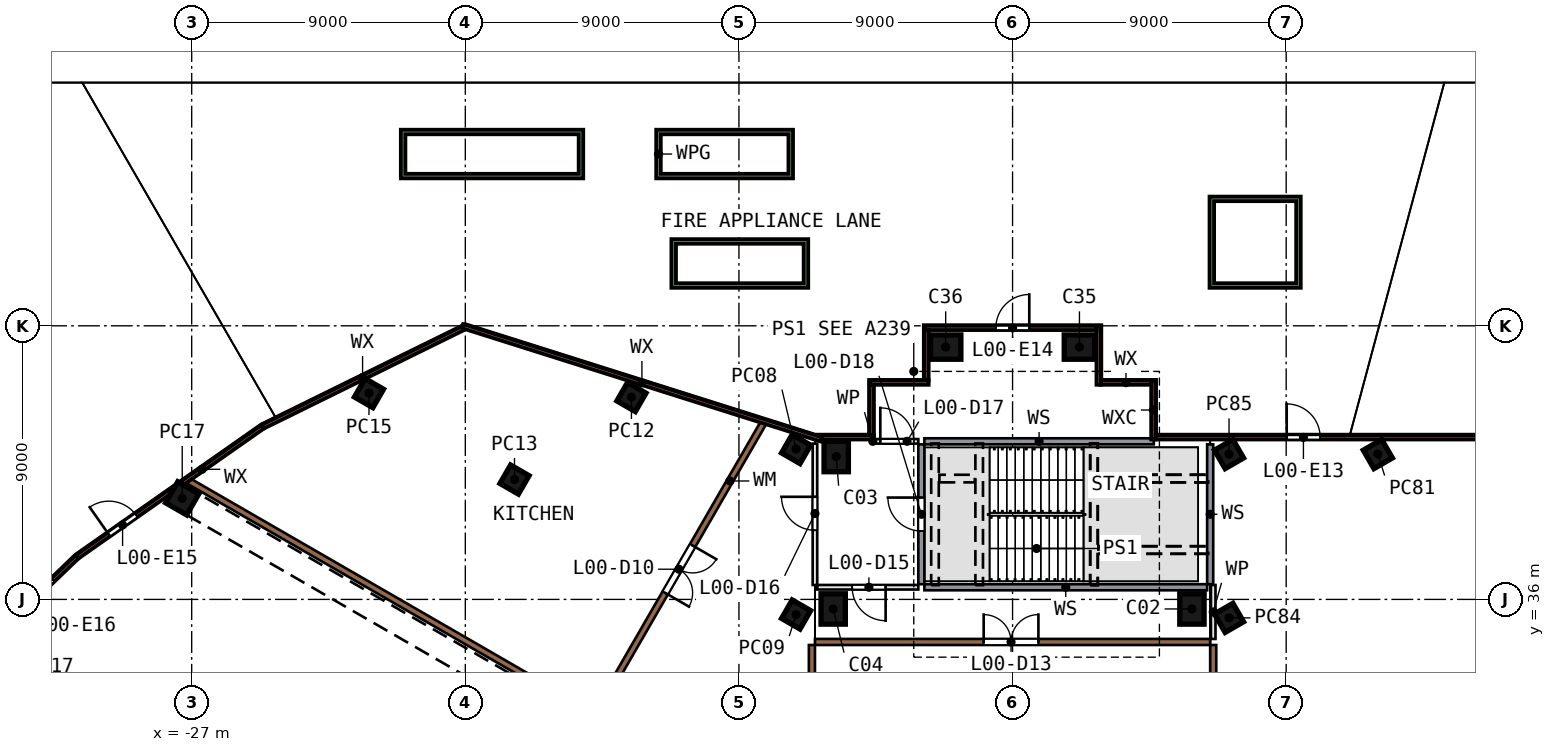
"""IFC4 building model, lengths in metres.
Left out: names, types, materials, properties, quantities, classifications, styles, units other than length and angle.
Written with IfcOpenShell. Run it as: python <this file> out.ifc"""

import sys

from ifc_helpers import new_model, si_unit, direction, frame, frame_2d, origin, origin_2d, place, context, subcontext, project, spatial, polyline, rectangle, outline, extrude, element, fill, save


model = new_model("IFC4")
c1 = context("Model", 3, precision=1e-05, world=origin(), true_north=direction((0.0, 1.0)))
c2 = subcontext(c1, "Body", "Model", "MODEL_VIEW")
j1 = project(units=[si_unit("LENGTHUNIT", "METRE"), si_unit("PLANEANGLEUNIT", "RADIAN")], contexts=[c1])
p1 = place(None, origin())
s1 = spatial("IfcSite", under=j1, at=p1, CompositionType="ELEMENT")
p2 = place(p1, origin())
s2 = spatial("IfcBuilding", under=s1, at=p2, CompositionType="ELEMENT")
p3 = place(p2, origin())
s3 = spatial("IfcBuildingStorey", under=s2, at=p3, CompositionType="ELEMENT", Elevation=0.0)
for number, where, z_axis, x_axis in (
    (1, (5.9, 35.686, 0.0), (0.0, 0.0, 1.0), (0.0, 1.0, 0.0)),
    (2, (-5.8, 40.7, 0.0), (0.0, 0.0, 1.0), (0.0, -1.0, 0.0)),
    (3, (-5.9, 35.686, 0.0), (0.0, 0.0, 1.0), (0.0, -1.0, 0.0)),
    (4, (2.2, 44.3, 0.0), (0.0, 0.0, 1.0), (-1.0, 0.0, 0.0)),
    (5, (-2.2, 44.3, 0.0), (0.0, 0.0, 1.0), (-1.0, 0.0, 0.0)),
):
    element("IfcColumn", number, at=place(p3, frame(where, z_axis=z_axis, x_axis=x_axis)), inside=s3, PredefinedType="COLUMN", context=c2, shape_type="SweptSolid", body=[
        extrude(rectangle(XDim=1.0, YDim=0.8, at=origin_2d()), origin(), (0.0, 0.0, 1.0), 7.55),
    ])
for number, where, z_axis, x_axis in (
    (6, (-7.12, 40.946, 0.0), (0.0, 0.0, 1.0), (-0.866, 0.5, 0.0)),
    (7, (-7.12, 35.503, 0.0), (0.0, 0.0, 1.0), (-0.866, 0.5, 0.0)),
    (8, (-12.536, 42.657, 0.0), (0.0, 0.0, 1.0), (-0.866, 0.5, 0.0)),
    (9, (-16.382, 39.942, 0.0), (0.0, 0.0, 1.0), (-0.866, 0.5, 0.0)),
    (10, (-21.168, 42.786, 0.0), (0.0, 0.0, 1.0), (-0.866, 0.5, 0.0)),
):
    element("IfcColumn", number, at=place(p3, frame(where, z_axis=z_axis, x_axis=x_axis)), inside=s3, PredefinedType="COLUMN", context=c2, shape_type="SweptSolid", body=[
        extrude(rectangle(XDim=0.7, YDim=0.7, at=origin_2d()), origin(), (0.0, 0.0, 1.0), 8.0),
    ])
p4 = place(p3, frame((-27.312, 39.324, 0.0), z_axis=(0.0, 0.0, 1.0), x_axis=(-0.866025404, 0.5, 0.0)))
e11 = element("IfcColumn", 11, at=p4, inside=s3, PredefinedType="COLUMN", context=c2, shape_type="SweptSolid", body=[
    extrude(rectangle(XDim=0.8, YDim=0.8, at=origin_2d()), origin(), (0.0, 0.0, 1.0), 8.0),
])
for number, where, z_axis, x_axis in (
    (12, (12.014, 40.78, 0.0), (0.0, 0.0, 1.0), (0.866, 0.5, 0.0)),
    (13, (7.12, 35.392, 0.0), (0.0, 0.0, 1.0), (0.866, 0.5, 0.0)),
    (14, (7.12, 40.78, 0.0), (0.0, 0.0, 1.0), (0.866, 0.5, 0.0)),
):
    element("IfcColumn", number, at=place(p3, frame(where, z_axis=z_axis, x_axis=x_axis)), inside=s3, PredefinedType="COLUMN", context=c2, shape_type="SweptSolid", body=[
        extrude(rectangle(XDim=0.7, YDim=0.7, at=origin_2d()), origin(), (0.0, 0.0, 1.0), 8.0),
    ])
p5 = place(p3, frame((4.7, 41.33, 0.0), z_axis=(0.0, 0.0, 1.0), x_axis=(1.0, 0.0, 0.0)))
e15 = element("IfcWall", 15, at=p5, inside=s3, PredefinedType="SOLIDWALL", context=c2, shape_type="SweptSolid", body=[
    extrude(rectangle(XDim=17.156, YDim=0.14, at=frame_2d((8.578, 0.0))), origin(), (0.0, 0.0, 1.0), 7.55),
])
p6 = place(p5, frame((4.317, 0.0, 0.0)))
e16 = element("IfcOpeningElement", 16, at=p6, cuts=e15, PredefinedType="OPENING", context=c2, shape_type="SweptSolid", body=[
    extrude(rectangle(XDim=1.1, YDim=2.4, at=frame_2d((0.55, 1.2))), frame((0.0, 0.08, 0.0), z_axis=(0.0, -1.0, 0.0), x_axis=(1.0, 0.0, 0.0)), (0.0, 0.0, 1.0), 0.16),
])
p7 = place(p3, frame((4.63, 41.26, 0.0), z_axis=(0.0, 0.0, 1.0), x_axis=(0.0, 1.0, 0.0)))
e17 = element("IfcWall", 17, at=p7, inside=s3, PredefinedType="SOLIDWALL", context=c2, shape_type="SweptSolid", body=[
    extrude(rectangle(XDim=1.94, YDim=0.14, at=frame_2d((0.97, 0.0))), origin(), (0.0, 0.0, 1.0), 7.55),
])
p8 = place(p3, frame((4.56, 43.13, 0.0), z_axis=(0.0, 0.0, 1.0), x_axis=(-1.0, 0.0, 0.0)))
e18 = element("IfcWall", 18, at=p8, inside=s3, PredefinedType="SOLIDWALL", context=c2, shape_type="SweptSolid", body=[
    extrude(rectangle(XDim=1.66, YDim=0.14, at=frame_2d((0.83, 0.0))), origin(), (0.0, 0.0, 1.0), 7.55),
])
p9 = place(p3, frame((2.83, 43.06, 0.0), z_axis=(0.0, 0.0, 1.0), x_axis=(0.0, 1.0, 0.0)))
e19 = element("IfcWall", 19, at=p9, inside=s3, PredefinedType="SOLIDWALL", context=c2, shape_type="SweptSolid", body=[
    extrude(rectangle(XDim=1.94, YDim=0.14, at=frame_2d((0.97, 0.0))), origin(), (0.0, 0.0, 1.0), 7.55),
])
p10 = place(p3, frame((-2.9, 44.93, 0.0), z_axis=(0.0, 0.0, 1.0), x_axis=(1.0, 0.0, 0.0)))
e20 = element("IfcWall", 20, at=p10, inside=s3, PredefinedType="SOLIDWALL", context=c2, shape_type="SweptSolid", body=[
    extrude(rectangle(XDim=5.66, YDim=0.14, at=frame_2d((2.83, 0.0))), origin(), (0.0, 0.0, 1.0), 7.55),
])
p11 = place(p10, frame((2.35, 0.0, 0.0)))
e21 = element("IfcOpeningElement", 21, at=p11, cuts=e20, PredefinedType="OPENING", context=c2, shape_type="SweptSolid", body=[
    extrude(rectangle(XDim=1.1, YDim=2.4, at=frame_2d((0.55, 1.2))), frame((0.0, 0.08, 0.0), z_axis=(0.0, -1.0, 0.0), x_axis=(1.0, 0.0, 0.0)), (0.0, 0.0, 1.0), 0.16),
])
p12 = place(p3, frame((-2.83, 44.86, 0.0), z_axis=(0.0, 0.0, 1.0), x_axis=(0.0, -1.0, 0.0)))
e22 = element("IfcWall", 22, at=p12, inside=s3, PredefinedType="SOLIDWALL", context=c2, shape_type="SweptSolid", body=[
    extrude(rectangle(XDim=1.66, YDim=0.14, at=frame_2d((0.83, 0.0))), origin(), (0.0, 0.0, 1.0), 7.55),
])
p13 = place(p3, frame((-2.76, 43.13, 0.0), z_axis=(0.0, 0.0, 1.0), x_axis=(-1.0, 0.0, 0.0)))
e23 = element("IfcWall", 23, at=p13, inside=s3, PredefinedType="SOLIDWALL", context=c2, shape_type="SweptSolid", body=[
    extrude(rectangle(XDim=1.94, YDim=0.14, at=frame_2d((0.97, 0.0))), origin(), (0.0, 0.0, 1.0), 7.55),
])
p14 = place(p3, frame((-4.63, 43.06, 0.0), z_axis=(0.0, 0.0, 1.0), x_axis=(0.0, -1.0, 0.0)))
e24 = element("IfcWall", 24, at=p14, inside=s3, PredefinedType="SOLIDWALL", context=c2, shape_type="SweptSolid", body=[
    extrude(rectangle(XDim=1.66, YDim=0.14, at=frame_2d((0.83, 0.0))), origin(), (0.0, 0.0, 1.0), 7.55),
])
p15 = place(p3, frame((-4.56, 41.33, 0.0), z_axis=(0.0, 0.0, 1.0), x_axis=(-1.0, 0.0, 0.0)))
e25 = element("IfcWall", 25, at=p15, inside=s3, PredefinedType="SOLIDWALL", context=c2, shape_type="SweptSolid", body=[
    extrude(rectangle(XDim=1.719, YDim=0.14, at=frame_2d((0.859, 0.0))), origin(), (0.0, 0.0, 1.0), 7.55),
])
p16 = place(p3, frame((-6.289, 41.26, 0.0), z_axis=(0.0, 0.0, 1.0), x_axis=(-0.953524528, 0.301315407, 0.0)))
e26 = element("IfcWall", 26, at=p16, inside=s3, PredefinedType="SOLIDWALL", context=c2, shape_type="SweptSolid", body=[
    extrude(rectangle(XDim=12.38, YDim=0.14, at=frame_2d((6.19, 0.0))), origin(), (0.0, 0.0, 1.0), 7.55),
])
p17 = place(p3, frame((-18.088, 44.915, 0.0), z_axis=(0.0, 0.0, 1.0), x_axis=(-0.897231327, -0.441560807, 0.0)))
e27 = element("IfcWall", 27, at=p17, inside=s3, PredefinedType="SOLIDWALL", context=c2, shape_type="SweptSolid", body=[
    extrude(rectangle(XDim=7.336, YDim=0.14, at=frame_2d((3.668, 0.0))), origin(), (0.0, 0.0, 1.0), 7.55),
])
p18 = place(p3, frame((-30.774, 37.396, 0.0), z_axis=(0.0, 0.0, 1.0), x_axis=(0.818847658, 0.5740109, 0.0)))
e28 = element("IfcWall", 28, at=p18, inside=s3, PredefinedType="SOLIDWALL", context=c2, shape_type="SweptSolid", body=[
    extrude(rectangle(XDim=7.466, YDim=0.14, at=frame_2d((3.733, 0.0))), origin(), (0.0, 0.0, 1.0), 7.55),
])
p19 = place(p18, frame((1.283, 0.0, 0.0)))
e29 = element("IfcOpeningElement", 29, at=p19, cuts=e28, PredefinedType="OPENING", context=c2, shape_type="SweptSolid", body=[
    extrude(rectangle(XDim=1.1, YDim=2.4, at=frame_2d((0.55, 1.2))), frame((0.0, 0.08, 0.0), z_axis=(0.0, -1.0, 0.0), x_axis=(1.0, 0.0, 0.0)), (0.0, 0.0, 1.0), 0.16),
])
p20 = place(p3, frame((-36.149, 32.229, 0.0), z_axis=(0.0, 0.0, 1.0), x_axis=(0.721028464, 0.692905444, 0.0)))
e30 = element("IfcWall", 30, at=p20, inside=s3, PredefinedType="SOLIDWALL", context=c2, shape_type="SweptSolid", body=[
    extrude(rectangle(XDim=7.466, YDim=0.14, at=frame_2d((3.733, 0.0))), origin(), (0.0, 0.0, 1.0), 7.55),
])
p21 = place(p20, frame((5.269, 0.0, 0.0)))
e31 = element("IfcOpeningElement", 31, at=p21, cuts=e30, PredefinedType="OPENING", context=c2, shape_type="SweptSolid", body=[
    extrude(rectangle(XDim=1.1, YDim=2.4, at=frame_2d((0.55, 1.2))), frame((0.0, 0.08, 0.0), z_axis=(0.0, -1.0, 0.0), x_axis=(1.0, 0.0, 0.0)), (0.0, 0.0, 1.0), 0.16),
])
p22 = place(p20, frame((3.327, 0.0, 0.0)))
e32 = element("IfcOpeningElement", 32, at=p22, cuts=e30, PredefinedType="OPENING", context=c2, shape_type="SweptSolid", body=[
    extrude(rectangle(XDim=1.1, YDim=2.4, at=frame_2d((0.55, 1.2))), frame((0.0, 0.08, 0.0), z_axis=(0.0, -1.0, 0.0), x_axis=(1.0, 0.0, 0.0)), (0.0, 0.0, 1.0), 0.16),
])
p23 = place(p20, frame((1.385, 0.0, 0.0)))
e33 = element("IfcOpeningElement", 33, at=p23, cuts=e30, PredefinedType="OPENING", context=c2, shape_type="SweptSolid", body=[
    extrude(rectangle(XDim=1.1, YDim=2.4, at=frame_2d((0.55, 1.2))), frame((0.0, 0.08, 0.0), z_axis=(0.0, -1.0, 0.0), x_axis=(1.0, 0.0, 0.0)), (0.0, 0.0, 1.0), 0.16),
])
p24 = place(p3, origin())
e34 = element("IfcWall", 34, at=p24, inside=s3, PredefinedType="SOLIDWALL", context=c2, shape_type="SweptSolid", body=[
    extrude(outline(polyline([(-11.221, 46.25), (-6.721, 46.25), (-6.721, 47.85), (-11.221, 47.85), (-11.221, 46.25)]), holes=[polyline([(-11.071, 46.4), (-11.071, 47.7), (-6.871, 47.7), (-6.871, 46.4), (-11.071, 46.4)])]), origin(), (0.0, 0.0, 1.0), 0.6),
])
p25 = place(p3, origin())
e35 = element("IfcWall", 35, at=p25, inside=s3, PredefinedType="SOLIDWALL", context=c2, shape_type="SweptSolid", body=[
    extrude(outline(polyline([(6.479, 46.25), (9.479, 46.25), (9.479, 49.25), (6.479, 49.25), (6.479, 46.25)]), holes=[polyline([(6.629, 46.4), (6.629, 49.1), (9.329, 49.1), (9.329, 46.4), (6.629, 46.4)])]), origin(), (0.0, 0.0, 1.0), 0.6),
])
p26 = place(p3, origin())
e36 = element("IfcWall", 36, at=p26, inside=s3, PredefinedType="SOLIDWALL", context=c2, shape_type="SweptSolid", body=[
    extrude(outline(polyline([(-20.121, 49.85), (-14.121, 49.85), (-14.121, 51.45), (-20.121, 51.45), (-20.121, 49.85)]), holes=[polyline([(-19.971, 50.0), (-19.971, 51.3), (-14.271, 51.3), (-14.271, 50.0), (-19.971, 50.0)])]), origin(), (0.0, 0.0, 1.0), 0.6),
])
p27 = place(p3, origin())
e37 = element("IfcWall", 37, at=p27, inside=s3, PredefinedType="SOLIDWALL", context=c2, shape_type="SweptSolid", body=[
    extrude(outline(polyline([(-11.721, 49.85), (-7.221, 49.85), (-7.221, 51.45), (-11.721, 51.45), (-11.721, 49.85)]), holes=[polyline([(-11.571, 50.0), (-11.571, 51.3), (-7.371, 51.3), (-7.371, 50.0), (-11.571, 50.0)])]), origin(), (0.0, 0.0, 1.0), 0.6),
])
p28 = place(p3, frame((-8.172, 41.846, 0.0), z_axis=(0.0, 0.0, 1.0), x_axis=(-0.499985024, -0.86603405, 0.0)))
e38 = element("IfcWall", 38, at=p28, inside=s3, PredefinedType="SOLIDWALL", context=c2, shape_type="SweptSolid", body=[
    extrude(rectangle(XDim=11.053, YDim=0.2, at=frame_2d((5.527, 0.0))), origin(), (0.0, 0.0, 1.0), 7.55),
])
p29 = place(p28, frame((4.704, 0.0, 0.0)))
e39 = element("IfcOpeningElement", 39, at=p29, cuts=e38, PredefinedType="OPENING", context=c2, shape_type="SweptSolid", body=[
    extrude(rectangle(XDim=1.8, YDim=2.1, at=frame_2d((0.9, 1.05))), frame((0.0, 0.11, 0.0), z_axis=(0.0, -1.0, 0.0), x_axis=(1.0, 0.0, 0.0)), (0.0, 0.0, 1.0), 0.22),
])
p30 = place(p3, frame((-13.835, 32.237, 0.0), z_axis=(0.0, 0.0, 1.0), x_axis=(-0.866027181, 0.499996921, 0.0)))
e40 = element("IfcWall", 40, at=p30, inside=s3, PredefinedType="SOLIDWALL", context=c2, shape_type="SweptSolid", body=[
    extrude(rectangle(XDim=15.348, YDim=0.2, at=frame_2d((7.674, 0.0))), origin(), (0.0, 0.0, 1.0), 7.55),
])
p31 = place(p3, frame((-6.6, 34.5, 0.0), z_axis=(0.0, 0.0, 1.0), x_axis=(0.0, -1.0, 0.0)))
e41 = element("IfcWall", 41, at=p31, inside=s3, PredefinedType="SOLIDWALL", context=c2, shape_type="SweptSolid", body=[
    extrude(rectangle(XDim=10.841, YDim=0.2, at=frame_2d((5.42, 0.0))), origin(), (0.0, 0.0, 1.0), 7.55),
])
p32 = place(p3, frame((-6.5, 34.6, 0.0), z_axis=(0.0, 0.0, 1.0), x_axis=(1.0, 0.0, 0.0)))
e42 = element("IfcWall", 42, at=p32, inside=s3, PredefinedType="SOLIDWALL", context=c2, shape_type="SweptSolid", body=[
    extrude(rectangle(XDim=13.0, YDim=0.2, at=frame_2d((6.5, 0.0))), origin(), (0.0, 0.0, 1.0), 7.55),
])
p33 = place(p32, frame((5.55, 0.0, 0.0)))
e43 = element("IfcOpeningElement", 43, at=p33, cuts=e42, PredefinedType="OPENING", context=c2, shape_type="SweptSolid", body=[
    extrude(rectangle(XDim=1.8, YDim=2.1, at=frame_2d((0.9, 1.05))), frame((0.0, 0.11, 0.0), z_axis=(0.0, -1.0, 0.0), x_axis=(1.0, 0.0, 0.0)), (0.0, 0.0, 1.0), 0.22),
])
p34 = place(p3, frame((-3.1, 36.4, 0.0), z_axis=(0.0, 0.0, 1.0), x_axis=(-1.0, 0.0, 0.0)))
e44 = element("IfcWall", 44, at=p34, inside=s3, PredefinedType="PARTITIONING", context=c2, shape_type="SweptSolid", body=[
    extrude(rectangle(XDim=3.325, YDim=0.15, at=frame_2d((1.663, 0.0))), origin(), (0.0, 0.0, 1.0), 7.55),
])
p35 = place(p34, frame((1.075, 0.0, 0.0)))
e45 = element("IfcOpeningElement", 45, at=p35, cuts=e44, PredefinedType="OPENING", context=c2, shape_type="SweptSolid", body=[
    extrude(rectangle(XDim=1.1, YDim=2.1, at=frame_2d((0.55, 1.05))), frame((0.0, 0.085, 0.0), z_axis=(0.0, -1.0, 0.0), x_axis=(1.0, 0.0, 0.0)), (0.0, 0.0, 1.0), 0.17),
])
p36 = place(p3, frame((-6.5, 36.475, 0.0), z_axis=(0.0, 0.0, 1.0), x_axis=(0.0, 1.0, 0.0)))
e46 = element("IfcWall", 46, at=p36, inside=s3, PredefinedType="PARTITIONING", context=c2, shape_type="SweptSolid", body=[
    extrude(rectangle(XDim=4.65, YDim=0.15, at=frame_2d((2.325, 0.0))), origin(), (0.0, 0.0, 1.0), 7.55),
])
p37 = place(p36, frame((1.8, 0.0, 0.0)))
e47 = element("IfcOpeningElement", 47, at=p37, cuts=e46, PredefinedType="OPENING", context=c2, shape_type="SweptSolid", body=[
    extrude(rectangle(XDim=1.1, YDim=2.1, at=frame_2d((0.55, 1.05))), frame((0.0, 0.085, 0.0), z_axis=(0.0, -1.0, 0.0), x_axis=(1.0, 0.0, 0.0)), (0.0, 0.0, 1.0), 0.17),
])
p38 = place(p3, frame((-2.9, 36.4, 0.0), z_axis=(0.0, 0.0, 1.0), x_axis=(1.0, 0.0, 0.0)))
e48 = element("IfcWall", 48, at=p38, inside=s3, PredefinedType="SOLIDWALL", context=c2, shape_type="SweptSolid", body=[
    extrude(rectangle(XDim=9.3, YDim=0.2, at=frame_2d((4.65, 0.0))), origin(), (0.0, 0.0, 1.0), 7.55),
])
p39 = place(p3, frame((-4.645, 41.2, 0.0), z_axis=(0.0, 0.0, 1.0), x_axis=(1.0, 0.0, 0.0)))
e49 = element("IfcWall", 49, at=p39, inside=s3, PredefinedType="PARTITIONING", context=c2, shape_type="SweptSolid", body=[
    extrude(rectangle(XDim=1.545, YDim=0.15, at=frame_2d((0.772, 0.0))), origin(), (0.0, 0.0, 1.0), 7.55),
])
p40 = place(p39, frame((0.295, 0.0, 0.0)))
e50 = element("IfcOpeningElement", 50, at=p40, cuts=e49, PredefinedType="OPENING", context=c2, shape_type="SweptSolid", body=[
    extrude(rectangle(XDim=1.1, YDim=2.1, at=frame_2d((0.55, 1.05))), frame((0.0, 0.085, 0.0), z_axis=(0.0, -1.0, 0.0), x_axis=(1.0, 0.0, 0.0)), (0.0, 0.0, 1.0), 0.17),
])
p41 = place(p3, frame((-3.0, 36.5, 0.0), z_axis=(0.0, 0.0, 1.0), x_axis=(0.0, 1.0, 0.0)))
e51 = element("IfcWall", 51, at=p41, inside=s3, PredefinedType="SOLIDWALL", context=c2, shape_type="SweptSolid", body=[
    extrude(rectangle(XDim=4.6, YDim=0.2, at=frame_2d((2.3, 0.0))), origin(), (0.0, 0.0, 1.0), 7.55),
])
p42 = place(p41, frame((1.75, 0.0, 0.0)))
e52 = element("IfcOpeningElement", 52, at=p42, cuts=e51, PredefinedType="OPENING", context=c2, shape_type="SweptSolid", body=[
    extrude(rectangle(XDim=1.1, YDim=2.1, at=frame_2d((0.55, 1.05))), frame((0.0, 0.11, 0.0), z_axis=(0.0, -1.0, 0.0), x_axis=(1.0, 0.0, 0.0)), (0.0, 0.0, 1.0), 0.22),
])
p43 = place(p3, frame((6.5, 36.5, 0.0), z_axis=(0.0, 0.0, 1.0), x_axis=(0.0, 1.0, 0.0)))
e53 = element("IfcWall", 53, at=p43, inside=s3, PredefinedType="SOLIDWALL", context=c2, shape_type="SweptSolid", body=[
    extrude(rectangle(XDim=4.6, YDim=0.2, at=frame_2d((2.3, 0.0))), origin(), (0.0, 0.0, 1.0), 7.55),
])
p44 = place(p3, frame((4.645, 41.2, 0.0), z_axis=(0.0, 0.0, 1.0), x_axis=(-1.0, 0.0, 0.0)))
e54 = element("IfcWall", 54, at=p44, inside=s3, PredefinedType="SOLIDWALL", context=c2, shape_type="SweptSolid", body=[
    extrude(rectangle(XDim=7.545, YDim=0.2, at=frame_2d((3.772, 0.0))), origin(), (0.0, 0.0, 1.0), 7.55),
])
p45 = place(p3, frame((6.6, 23.659, 0.0), z_axis=(0.0, 0.0, 1.0), x_axis=(0.0, 1.0, 0.0)))
e55 = element("IfcWall", 55, at=p45, inside=s3, PredefinedType="SOLIDWALL", context=c2, shape_type="SweptSolid", body=[
    extrude(rectangle(XDim=10.841, YDim=0.2, at=frame_2d((5.42, 0.0))), origin(), (0.0, 0.0, 1.0), 7.55),
])
p46 = place(p3, frame((6.6, 34.7, 0.0), z_axis=(0.0, 0.0, 1.0), x_axis=(0.0, 1.0, 0.0)))
e56 = element("IfcWall", 56, at=p46, inside=s3, PredefinedType="PARTITIONING", context=c2, shape_type="SweptSolid", body=[
    extrude(rectangle(XDim=1.775, YDim=0.15, at=frame_2d((0.888, 0.0))), origin(), (0.0, 0.0, 1.0), 7.55),
])
p47 = place(p6, origin())
e57 = element("IfcDoor", 57, at=p47, inside=s3, OperationType="SINGLE_SWING_LEFT", PredefinedType="DOOR", context=c2, shape_type="SweptSolid", body=[
    extrude(rectangle(XDim=1.1, YDim=2.4, at=frame_2d((0.55, 1.2))), frame((0.0, 0.025, 0.0), z_axis=(0.0, -1.0, 0.0), x_axis=(1.0, 0.0, 0.0)), (0.0, 0.0, 1.0), 0.05),
])
fill(e16, e57)
p48 = place(p11, origin())
e58 = element("IfcDoor", 58, at=p48, inside=s3, OperationType="SINGLE_SWING_RIGHT", PredefinedType="DOOR", context=c2, shape_type="SweptSolid", body=[
    extrude(rectangle(XDim=1.1, YDim=2.4, at=frame_2d((0.55, 1.2))), frame((0.0, 0.025, 0.0), z_axis=(0.0, -1.0, 0.0), x_axis=(1.0, 0.0, 0.0)), (0.0, 0.0, 1.0), 0.05),
])
fill(e21, e58)
p49 = place(p19, origin())
e59 = element("IfcDoor", 59, at=p49, inside=s3, OperationType="SINGLE_SWING_LEFT", PredefinedType="DOOR", context=c2, shape_type="SweptSolid", body=[
    extrude(rectangle(XDim=1.1, YDim=2.4, at=frame_2d((0.55, 1.2))), frame((0.0, 0.025, 0.0), z_axis=(0.0, -1.0, 0.0), x_axis=(1.0, 0.0, 0.0)), (0.0, 0.0, 1.0), 0.05),
])
fill(e29, e59)
p50 = place(p21, origin())
e60 = element("IfcDoor", 60, at=p50, inside=s3, OperationType="SINGLE_SWING_RIGHT", PredefinedType="DOOR", context=c2, shape_type="SweptSolid", body=[
    extrude(rectangle(XDim=1.1, YDim=2.4, at=frame_2d((0.55, 1.2))), frame((0.0, 0.025, 0.0), z_axis=(0.0, -1.0, 0.0), x_axis=(1.0, 0.0, 0.0)), (0.0, 0.0, 1.0), 0.05),
])
fill(e31, e60)
p51 = place(p29, origin())
e61 = element("IfcDoor", 61, at=p51, inside=s3, OperationType="DOUBLE_DOOR_SINGLE_SWING", PredefinedType="DOOR", context=c2, shape_type="SweptSolid", body=[
    extrude(rectangle(XDim=1.8, YDim=2.1, at=frame_2d((0.9, 1.05))), frame((0.0, 0.025, 0.0), z_axis=(0.0, -1.0, 0.0), x_axis=(1.0, 0.0, 0.0)), (0.0, 0.0, 1.0), 0.05),
])
fill(e39, e61)
p52 = place(p33, origin())
e62 = element("IfcDoor", 62, at=p52, inside=s3, OperationType="DOUBLE_DOOR_SINGLE_SWING", PredefinedType="DOOR", context=c2, shape_type="SweptSolid", body=[
    extrude(rectangle(XDim=1.8, YDim=2.1, at=frame_2d((0.9, 1.05))), frame((0.0, 0.025, 0.0), z_axis=(0.0, -1.0, 0.0), x_axis=(1.0, 0.0, 0.0)), (0.0, 0.0, 1.0), 0.05),
])
fill(e43, e62)
p53 = place(p35, origin())
e63 = element("IfcDoor", 63, at=p53, inside=s3, OperationType="SINGLE_SWING_LEFT", PredefinedType="DOOR", context=c2, shape_type="SweptSolid", body=[
    extrude(rectangle(XDim=1.1, YDim=2.1, at=frame_2d((0.55, 1.05))), frame((0.0, 0.025, 0.0), z_axis=(0.0, -1.0, 0.0), x_axis=(1.0, 0.0, 0.0)), (0.0, 0.0, 1.0), 0.05),
])
fill(e45, e63)
p54 = place(p37, origin())
e64 = element("IfcDoor", 64, at=p54, inside=s3, OperationType="SINGLE_SWING_RIGHT", PredefinedType="DOOR", context=c2, shape_type="SweptSolid", body=[
    extrude(rectangle(XDim=1.1, YDim=2.1, at=frame_2d((0.55, 1.05))), frame((0.0, 0.025, 0.0), z_axis=(0.0, -1.0, 0.0), x_axis=(1.0, 0.0, 0.0)), (0.0, 0.0, 1.0), 0.05),
])
fill(e47, e64)
p55 = place(p40, origin())
e65 = element("IfcDoor", 65, at=p55, inside=s3, OperationType="SINGLE_SWING_LEFT", PredefinedType="DOOR", context=c2, shape_type="SweptSolid", body=[
    extrude(rectangle(XDim=1.1, YDim=2.1, at=frame_2d((0.55, 1.05))), frame((0.0, 0.025, 0.0), z_axis=(0.0, -1.0, 0.0), x_axis=(1.0, 0.0, 0.0)), (0.0, 0.0, 1.0), 0.05),
])
fill(e50, e65)
p56 = place(p42, origin())
e66 = element("IfcDoor", 66, at=p56, inside=s3, OperationType="SINGLE_SWING_RIGHT", PredefinedType="DOOR", context=c2, shape_type="SweptSolid", body=[
    extrude(rectangle(XDim=1.1, YDim=2.1, at=frame_2d((0.55, 1.05))), frame((0.0, 0.025, 0.0), z_axis=(0.0, -1.0, 0.0), x_axis=(1.0, 0.0, 0.0)), (0.0, 0.0, 1.0), 0.05),
])
fill(e52, e66)
save(model, sys.argv[1])
